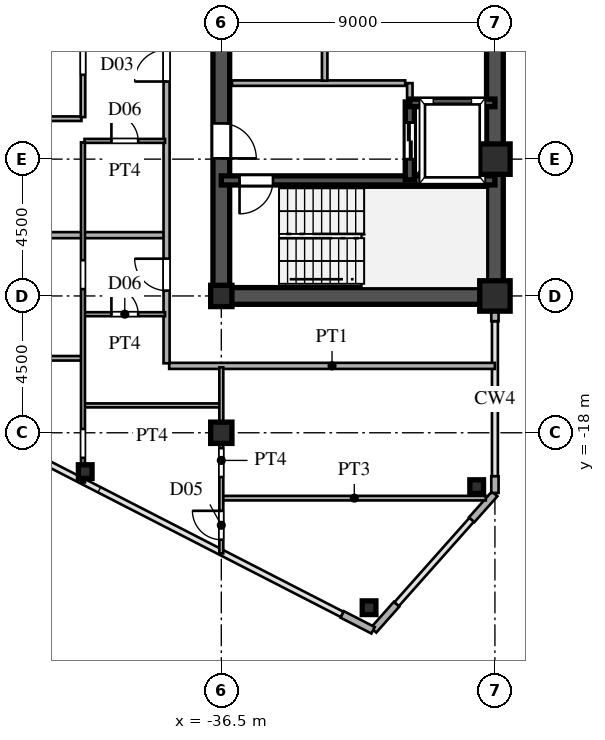
"""IFC4 building model, lengths in metres.
Left out: names, types, materials, properties, quantities, classifications, styles, units other than length and angle.
Written with IfcOpenShell. Run it as: python <this file> out.ifc"""

import sys

from ifc_helpers import new_model, si_unit, direction, frame, frame_2d, origin, origin_2d, place, context, subcontext, project, spatial, rectangle, hollow_rectangle, i_section, extrude, source, transform, mapped, element, fill, save


model = new_model("IFC4")
c1 = context("Model", 3, precision=1e-05, world=origin(), true_north=direction((0.0, 1.0)))
c2 = subcontext(c1, "Body", "Model", "MODEL_VIEW")
j1 = project(units=[si_unit("LENGTHUNIT", "METRE"), si_unit("PLANEANGLEUNIT", "RADIAN")], contexts=[c1])
p1 = place(None, origin())
s1 = spatial("IfcSite", under=j1, at=p1, CompositionType="ELEMENT")
p2 = place(p1, origin())
s2 = spatial("IfcBuilding", under=s1, at=p2, CompositionType="ELEMENT")
p3 = place(p2, frame((0.0, 0.0, 144.0)))
s3 = spatial("IfcBuildingStorey", under=s2, at=p3, CompositionType="ELEMENT", Elevation=144.0)
m1 = source(origin(), c2, "Body", "SweptSolid", [
    extrude(hollow_rectangle(XDim=1.0, YDim=1.0, WallThickness=0.042, at=origin_2d()), origin(), (0.0, 0.0, 1.0), 3.6),
])
for number, where, z_axis, x_axis in (
    (1, (-27.5, -13.5, 0.0), (0.0, 0.0, 1.0), (1.0, 0.0, 0.0)),
    (2, (-27.5, -9.0, 0.0), (0.0, 0.0, 1.0), (1.0, 0.0, 0.0)),
):
    element("IfcColumn", number, at=place(p3, frame(where, z_axis=z_axis, x_axis=x_axis)), inside=s3, PredefinedType="COLUMN", context=c2, shape_type="MappedRepresentation", body=[
        mapped(m1, transform((0.0, 0.0, 0.0), scale=1.0)),
    ])
m2 = source(origin(), c2, "Body", "SweptSolid", [
    extrude(i_section(OverallWidth=0.7, OverallDepth=0.7, WebThickness=0.028, FlangeThickness=0.045, at=origin_2d()), origin(), (0.0, 0.0, 1.0), 3.6),
])
for number, where, z_axis, x_axis in (
    (3, (-36.5, -18.0, 0.0), (0.0, 0.0, 1.0), (1.0, 0.0, 0.0)),
    (4, (-36.5, -13.5, 0.0), (0.0, 0.0, 1.0), (1.0, 0.0, 0.0)),
):
    element("IfcColumn", number, at=place(p3, frame(where, z_axis=z_axis, x_axis=x_axis)), inside=s3, PredefinedType="COLUMN", context=c2, shape_type="MappedRepresentation", body=[
        mapped(m2, transform((0.0, 0.0, 0.0), scale=1.0)),
    ])
m3 = source(origin(), c2, "Body", "SweptSolid", [
    extrude(hollow_rectangle(XDim=0.45, YDim=0.45, WallThickness=0.018, at=origin_2d()), origin(), (0.0, 0.0, 1.0), 3.6),
])
for number, where, z_axis, x_axis in (
    (5, (-28.1, -19.772, 0.0), (0.0, 0.0, 1.0), (1.0, 0.0, 0.0)),
    (6, (-31.64, -23.754, 0.0), (0.0, 0.0, 1.0), (1.0, 0.0, 0.0)),
    (7, (-40.976, -19.278, 0.0), (0.0, 0.0, 1.0), (1.0, 0.0, 0.0)),
):
    element("IfcColumn", number, at=place(p3, frame(where, z_axis=z_axis, x_axis=x_axis)), inside=s3, PredefinedType="COLUMN", context=c2, shape_type="MappedRepresentation", body=[
        mapped(m3, transform((0.0, 0.0, 0.0), scale=1.0)),
    ])
p4 = place(p3, frame((-27.5, -19.98, 0.0), z_axis=(0.0, 0.0, 1.0), x_axis=(0.0, 1.0, 0.0)))
e8 = element("IfcWall", 8, at=p4, inside=s3, PredefinedType="SOLIDWALL", context=c2, shape_type="SweptSolid", body=[
    extrude(rectangle(XDim=0.55, YDim=0.24, at=frame_2d((0.275, 0.0))), origin(), (0.0, 0.0, 1.0), 3.38),
])
p5 = place(p3, frame((-27.5, -14.33, 0.0), z_axis=(0.0, 0.0, 1.0), x_axis=(0.0, 1.0, 0.0)))
e9 = element("IfcWall", 9, at=p5, inside=s3, PredefinedType="SOLIDWALL", context=c2, shape_type="SweptSolid", body=[
    extrude(rectangle(XDim=0.55, YDim=0.24, at=frame_2d((0.275, 0.0))), origin(), (0.0, 0.0, 1.0), 2.88),
])
p6 = place(p3, frame((-32.523, -23.975, 0.0), z_axis=(0.0, 0.0, 1.0), x_axis=(0.889797395748, -0.456355776255, 0.0)))
e10 = element("IfcWall", 10, at=p6, inside=s3, PredefinedType="SOLIDWALL", context=c2, shape_type="SweptSolid", body=[
    extrude(rectangle(XDim=1.14, YDim=0.24, at=frame_2d((0.57, 0.0))), origin(), (0.0, 0.0, 1.0), 3.38),
])
for number, where, z_axis, x_axis in (
    (11, (-31.493, -24.492, 0.0), (0.0, 0.0, 1.0), (0.664, 0.747, 0.0)),
    (12, (-28.264, -20.86, 0.0), (0.0, 0.0, 1.0), (0.664, 0.747, 0.0)),
):
    element("IfcWall", number, at=place(p3, frame(where, z_axis=z_axis, x_axis=x_axis)), inside=s3, PredefinedType="SOLIDWALL", context=c2, shape_type="SweptSolid", body=[
        extrude(rectangle(XDim=1.14, YDim=0.24, at=frame_2d((0.57, 0.0))), origin(), (0.0, 0.0, 1.0), 3.38),
    ])
p7 = place(p3, frame((-27.5, -13.5, 0.0), z_axis=(0.0, 0.0, 1.0), x_axis=(0.0, 1.0, 0.0)))
e13 = element("IfcWall", 13, at=p7, inside=s3, PredefinedType="SHEAR", context=c2, shape_type="SweptSolid", body=[
    extrude(rectangle(XDim=12.2, YDim=0.55, at=frame_2d((6.1, 0.0))), origin(), (0.0, 0.0, 1.0), 3.38),
])
p8 = place(p3, frame((-36.5, -13.5, 0.0), z_axis=(0.0, 0.0, 1.0), x_axis=(1.0, 0.0, 0.0)))
e14 = element("IfcWall", 14, at=p8, inside=s3, PredefinedType="SHEAR", context=c2, shape_type="SweptSolid", body=[
    extrude(rectangle(XDim=9.0, YDim=0.55, at=frame_2d((4.5, 0.0))), origin(), (0.0, 0.0, 1.0), 3.38),
])
p9 = place(p3, frame((-36.5, -13.65, 0.0), z_axis=(0.0, 0.0, 1.0), x_axis=(0.0, 1.0, 0.0)))
e15 = element("IfcWall", 15, at=p9, inside=s3, PredefinedType="SHEAR", context=c2, shape_type="SweptSolid", body=[
    extrude(rectangle(XDim=7.15, YDim=0.55, at=frame_2d((3.575, 0.0))), origin(), (0.0, 0.0, 1.0), 3.38),
])
p10 = place(p9, frame((4.675, 0.0, 0.0)))
e16 = element("IfcOpeningElement", 16, at=p10, cuts=e15, PredefinedType="OPENING", context=c2, shape_type="SweptSolid", body=[
    extrude(rectangle(XDim=1.15, YDim=2.2, at=frame_2d((0.575, 1.1))), frame((0.0, 0.285, 0.0), z_axis=(0.0, -1.0, 0.0), x_axis=(1.0, 0.0, 0.0)), (0.0, 0.0, 1.0), 0.57),
])
p11 = place(p3, frame((-36.5, -6.5, 0.0), z_axis=(0.0, 0.0, 1.0), x_axis=(0.0, 1.0, 0.0)))
e17 = element("IfcWall", 17, at=p11, inside=s3, PredefinedType="SHEAR", context=c2, shape_type="SweptSolid", body=[
    extrude(rectangle(XDim=5.2, YDim=0.55, at=frame_2d((2.6, 0.0))), origin(), (0.0, 0.0, 1.0), 3.38),
])
p12 = place(p11, frame((2.125, 0.0, 0.0)))
e18 = element("IfcOpeningElement", 18, at=p12, cuts=e17, PredefinedType="OPENING", context=c2, shape_type="SweptSolid", body=[
    extrude(rectangle(XDim=0.95, YDim=2.15, at=frame_2d((0.475, 1.075))), frame((0.0, 0.285, 0.0), z_axis=(0.0, -1.0, 0.0), x_axis=(1.0, 0.0, 0.0)), (0.0, 0.0, 1.0), 0.57),
])
p13 = place(p3, frame((-36.5, -9.7, 0.0), z_axis=(0.0, 0.0, 1.0), x_axis=(1.0, 0.0, 0.0)))
e19 = element("IfcWall", 19, at=p13, inside=s3, PredefinedType="SHEAR", context=c2, shape_type="SweptSolid", body=[
    extrude(rectangle(XDim=9.0, YDim=0.3, at=frame_2d((4.5, 0.0))), origin(), (0.0, 0.0, 1.0), 3.38),
])
p14 = place(p13, frame((0.6, 0.0, 0.0)))
e20 = element("IfcOpeningElement", 20, at=p14, cuts=e19, PredefinedType="OPENING", context=c2, shape_type="SweptSolid", body=[
    extrude(rectangle(XDim=1.1, YDim=2.2, at=frame_2d((0.55, 1.1))), frame((0.0, 0.16, 0.0), z_axis=(0.0, -1.0, 0.0), x_axis=(1.0, 0.0, 0.0)), (0.0, 0.0, 1.0), 0.32),
])
p15 = place(p3, frame((-30.3, -7.15, 0.0), z_axis=(0.0, 0.0, 1.0), x_axis=(1.0, 0.0, 0.0)))
e21 = element("IfcWall", 21, at=p15, inside=s3, PredefinedType="SHEAR", context=c2, shape_type="SweptSolid", body=[
    extrude(rectangle(XDim=2.8, YDim=0.25, at=frame_2d((1.4, 0.0))), origin(), (0.0, 0.0, 1.0), 3.38),
])
p16 = place(p3, frame((-30.3, -9.68, 0.0), z_axis=(0.0, 0.0, 1.0), x_axis=(0.0, 1.0, 0.0)))
e22 = element("IfcWall", 22, at=p16, inside=s3, PredefinedType="SHEAR", context=c2, shape_type="SweptSolid", body=[
    extrude(rectangle(XDim=2.56, YDim=0.3, at=frame_2d((1.28, 0.0))), origin(), (0.0, 0.0, 1.0), 3.38),
])
p17 = place(p16, frame((0.68, 0.0, 0.0)))
e23 = element("IfcOpeningElement", 23, at=p17, cuts=e22, PredefinedType="OPENING", context=c2, shape_type="SweptSolid", body=[
    extrude(rectangle(XDim=1.2, YDim=2.25, at=frame_2d((0.6, 1.125))), frame((0.0, 0.16, 0.0), z_axis=(0.0, -1.0, 0.0), x_axis=(1.0, 0.0, 0.0)), (0.0, 0.0, 1.0), 0.32),
])
p18 = place(p3, frame((-36.15, -6.5, 0.0), z_axis=(0.0, 0.0, 1.0), x_axis=(1.0, 0.0, 0.0)))
e24 = element("IfcWall", 24, at=p18, inside=s3, PredefinedType="PARTITIONING", context=c2, shape_type="SweptSolid", body=[
    extrude(rectangle(XDim=5.7, YDim=0.18, at=frame_2d((2.85, 0.0))), origin(), (0.0, 0.0, 1.0), 3.38),
])
p19 = place(p3, frame((-30.3, -7.12, 0.0), z_axis=(0.0, 0.0, 1.0), x_axis=(0.0, 1.0, 0.0)))
e25 = element("IfcWall", 25, at=p19, inside=s3, PredefinedType="PARTITIONING", context=c2, shape_type="SweptSolid", body=[
    extrude(rectangle(XDim=0.62, YDim=0.18, at=frame_2d((0.31, 0.0))), origin(), (0.0, 0.0, 1.0), 3.38),
])
p20 = place(p3, frame((-33.1, -6.42, 0.0), z_axis=(0.0, 0.0, 1.0), x_axis=(0.0, 1.0, 0.0)))
e26 = element("IfcWall", 26, at=p20, inside=s3, PredefinedType="PARTITIONING", context=c2, shape_type="SweptSolid", body=[
    extrude(rectangle(XDim=5.04, YDim=0.18, at=frame_2d((2.52, 0.0))), origin(), (0.0, 0.0, 1.0), 3.38),
])
p21 = place(p3, frame((-36.45, -20.15, 0.0), z_axis=(0.0, 0.0, 1.0), x_axis=(1.0, 0.0, 0.0)))
e27 = element("IfcWall", 27, at=p21, inside=s3, PredefinedType="PARTITIONING", context=c2, shape_type="SweptSolid", body=[
    extrude(rectangle(XDim=8.649, YDim=0.15, at=frame_2d((4.325, 0.0))), origin(), (0.0, 0.0, 1.0), 3.38),
])
p22 = place(p3, frame((-41.0, -17.1, 0.0), z_axis=(0.0, 0.0, 1.0), x_axis=(1.0, 0.0, 0.0)))
e28 = element("IfcWall", 28, at=p22, inside=s3, PredefinedType="PARTITIONING", context=c2, shape_type="SweptSolid", body=[
    extrude(rectangle(XDim=4.45, YDim=0.13, at=frame_2d((2.225, 0.0))), origin(), (0.0, 0.0, 1.0), 3.38),
])
p23 = place(p3, frame((-38.215, -15.8, 0.0), z_axis=(0.0, 0.0, 1.0), x_axis=(1.0, 0.0, 0.0)))
e29 = element("IfcWall", 29, at=p23, inside=s3, PredefinedType="PARTITIONING", context=c2, shape_type="SweptSolid", body=[
    extrude(rectangle(XDim=10.715, YDim=0.2, at=frame_2d((5.357, 0.0))), origin(), (0.0, 0.0, 1.0), 3.38),
])
p24 = place(p3, frame((-48.977, -15.55, 0.0), z_axis=(0.0, 0.0, 1.0), x_axis=(1.0, 0.0, 0.0)))
e30 = element("IfcWall", 30, at=p24, inside=s3, PredefinedType="PARTITIONING", context=c2, shape_type="SweptSolid", body=[
    extrude(rectangle(XDim=7.877, YDim=0.15, at=frame_2d((3.938, 0.0))), origin(), (0.0, 0.0, 1.0), 3.38),
])
p25 = place(p24, frame((3.506, 0.0, 0.0)))
e31 = element("IfcOpeningElement", 31, at=p25, cuts=e30, PredefinedType="OPENING", context=c2, shape_type="SweptSolid", body=[
    extrude(rectangle(XDim=0.95, YDim=2.15, at=frame_2d((0.475, 1.075))), frame((0.0, 0.085, 0.0), z_axis=(0.0, -1.0, 0.0), x_axis=(1.0, 0.0, 0.0)), (0.0, 0.0, 1.0), 0.17),
])
p26 = place(p3, frame((-41.0, -14.1, 0.0), z_axis=(0.0, 0.0, 1.0), x_axis=(1.0, 0.0, 0.0)))
e32 = element("IfcWall", 32, at=p26, inside=s3, PredefinedType="PARTITIONING", context=c2, shape_type="SweptSolid", body=[
    extrude(rectangle(XDim=2.65, YDim=0.13, at=frame_2d((1.325, 0.0))), origin(), (0.0, 0.0, 1.0), 3.38),
])
p27 = place(p26, frame((0.885, 0.0, 0.0)))
e33 = element("IfcOpeningElement", 33, at=p27, cuts=e32, PredefinedType="OPENING", context=c2, shape_type="SweptSolid", body=[
    extrude(rectangle(XDim=0.88, YDim=2.1, at=frame_2d((0.44, 1.05))), frame((0.0, 0.075, 0.0), z_axis=(0.0, -1.0, 0.0), x_axis=(1.0, 0.0, 0.0)), (0.0, 0.0, 1.0), 0.15),
])
p28 = place(p3, frame((-56.844, -11.5, 0.0), z_axis=(0.0, 0.0, 1.0), x_axis=(1.0, 0.0, 0.0)))
e34 = element("IfcWall", 34, at=p28, inside=s3, PredefinedType="PARTITIONING", context=c2, shape_type="SweptSolid", body=[
    extrude(rectangle(XDim=18.464, YDim=0.2, at=frame_2d((9.232, 0.0))), origin(), (0.0, 0.0, 1.0), 3.38),
])
p29 = place(p3, frame((-41.0, -8.4, 0.0), z_axis=(0.0, 0.0, 1.0), x_axis=(1.0, 0.0, 0.0)))
e35 = element("IfcWall", 35, at=p29, inside=s3, PredefinedType="PARTITIONING", context=c2, shape_type="SweptSolid", body=[
    extrude(rectangle(XDim=2.65, YDim=0.13, at=frame_2d((1.325, 0.0))), origin(), (0.0, 0.0, 1.0), 3.38),
])
p30 = place(p29, frame((0.885, 0.0, 0.0)))
e36 = element("IfcOpeningElement", 36, at=p30, cuts=e35, PredefinedType="OPENING", context=c2, shape_type="SweptSolid", body=[
    extrude(rectangle(XDim=0.88, YDim=2.1, at=frame_2d((0.44, 1.05))), frame((0.0, 0.075, 0.0), z_axis=(0.0, -1.0, 0.0), x_axis=(1.0, 0.0, 0.0)), (0.0, 0.0, 1.0), 0.15),
])
p31 = place(p3, frame((-64.338, -7.67, 0.0), z_axis=(0.0, 0.0, 1.0), x_axis=(1.0, 0.0, 0.0)))
e37 = element("IfcWall", 37, at=p31, inside=s3, PredefinedType="PARTITIONING", context=c2, shape_type="SweptSolid", body=[
    extrude(rectangle(XDim=23.238, YDim=0.15, at=frame_2d((11.619, 0.0))), origin(), (0.0, 0.0, 1.0), 3.38),
])
p32 = place(p31, frame((16.088, 0.0, 0.0)))
e38 = element("IfcOpeningElement", 38, at=p32, cuts=e37, PredefinedType="OPENING", context=c2, shape_type="SweptSolid", body=[
    extrude(rectangle(XDim=0.95, YDim=2.15, at=frame_2d((0.475, 1.075))), frame((0.0, 0.085, 0.0), z_axis=(0.0, -1.0, 0.0), x_axis=(1.0, 0.0, 0.0)), (0.0, 0.0, 1.0), 0.17),
])
p33 = place(p3, frame((-41.05, -19.634, 0.0), z_axis=(0.0, 0.0, 1.0), x_axis=(0.0, 1.0, 0.0)))
e39 = element("IfcWall", 39, at=p33, inside=s3, PredefinedType="PARTITIONING", context=c2, shape_type="SweptSolid", body=[
    extrude(rectangle(XDim=11.187, YDim=0.13, at=frame_2d((5.594, 0.0))), origin(), (0.0, 0.0, 1.0), 2.99),
])
p34 = place(p33, frame((6.359, 0.0, 0.0)))
e40 = element("IfcOpeningElement", 40, at=p34, cuts=e39, PredefinedType="OPENING", context=c2, shape_type="SweptSolid", body=[
    extrude(rectangle(XDim=0.95, YDim=2.15, at=frame_2d((0.475, 1.075))), frame((0.0, 0.075, 0.0), z_axis=(0.0, -1.0, 0.0), x_axis=(1.0, 0.0, 0.0)), (0.0, 0.0, 1.0), 0.15),
])
p35 = place(p33, frame((0.809, 0.0, 0.0)))
e41 = element("IfcOpeningElement", 41, at=p35, cuts=e39, PredefinedType="OPENING", context=c2, shape_type="SweptSolid", body=[
    extrude(rectangle(XDim=0.95, YDim=2.15, at=frame_2d((0.475, 1.075))), frame((0.0, 0.075, 0.0), z_axis=(0.0, -1.0, 0.0), x_axis=(1.0, 0.0, 0.0)), (0.0, 0.0, 1.0), 0.15),
])
p36 = place(p3, frame((-41.05, -7.617, 0.0), z_axis=(0.0, 0.0, 1.0), x_axis=(0.0, 1.0, 0.0)))
e42 = element("IfcWall", 42, at=p36, inside=s3, PredefinedType="PARTITIONING", context=c2, shape_type="SweptSolid", body=[
    extrude(rectangle(XDim=3.734, YDim=0.15, at=frame_2d((1.867, 0.0))), origin(), (0.0, 0.0, 1.0), 2.99),
])
p37 = place(p36, frame((1.392, 0.0, 0.0)))
e43 = element("IfcOpeningElement", 43, at=p37, cuts=e42, PredefinedType="OPENING", context=c2, shape_type="SweptSolid", body=[
    extrude(rectangle(XDim=0.95, YDim=2.15, at=frame_2d((0.475, 1.075))), frame((0.0, 0.085, 0.0), z_axis=(0.0, -1.0, 0.0), x_axis=(1.0, 0.0, 0.0)), (0.0, 0.0, 1.0), 0.17),
])
p38 = place(p3, frame((-38.3, -15.715, 0.0), z_axis=(0.0, 0.0, 1.0), x_axis=(0.0, 1.0, 0.0)))
e44 = element("IfcWall", 44, at=p38, inside=s3, PredefinedType="PARTITIONING", context=c2, shape_type="SweptSolid", body=[
    extrude(rectangle(XDim=31.43, YDim=0.2, at=frame_2d((15.715, 0.0))), origin(), (0.0, 0.0, 1.0), 3.38),
])
p39 = place(p38, frame((2.39, 0.0, 0.0)))
e45 = element("IfcOpeningElement", 45, at=p39, cuts=e44, PredefinedType="OPENING", context=c2, shape_type="SweptSolid", body=[
    extrude(rectangle(XDim=1.05, YDim=2.25, at=frame_2d((0.525, 1.125))), frame((0.0, 0.11, 0.0), z_axis=(0.0, -1.0, 0.0), x_axis=(1.0, 0.0, 0.0)), (0.0, 0.0, 1.0), 0.22),
])
p40 = place(p38, frame((9.268, 0.0, 0.0)))
e46 = element("IfcOpeningElement", 46, at=p40, cuts=e44, PredefinedType="OPENING", context=c2, shape_type="SweptSolid", body=[
    extrude(rectangle(XDim=1.05, YDim=2.25, at=frame_2d((0.525, 1.125))), frame((0.0, 0.11, 0.0), z_axis=(0.0, -1.0, 0.0), x_axis=(1.0, 0.0, 0.0)), (0.0, 0.0, 1.0), 0.22),
])
p41 = place(p38, frame((20.04, 0.0, 0.0)))
e47 = element("IfcOpeningElement", 47, at=p41, cuts=e44, PredefinedType="OPENING", context=c2, shape_type="SweptSolid", body=[
    extrude(rectangle(XDim=1.05, YDim=2.25, at=frame_2d((0.525, 1.125))), frame((0.0, 0.11, 0.0), z_axis=(0.0, -1.0, 0.0), x_axis=(1.0, 0.0, 0.0)), (0.0, 0.0, 1.0), 0.22),
])
p42 = place(p38, frame((26.587, 0.0, 0.0)))
e48 = element("IfcOpeningElement", 48, at=p42, cuts=e44, PredefinedType="OPENING", context=c2, shape_type="SweptSolid", body=[
    extrude(rectangle(XDim=1.05, YDim=2.25, at=frame_2d((0.525, 1.125))), frame((0.0, 0.11, 0.0), z_axis=(0.0, -1.0, 0.0), x_axis=(1.0, 0.0, 0.0)), (0.0, 0.0, 1.0), 0.22),
])
p43 = place(p3, frame((-36.5, -21.969, 0.0), z_axis=(0.0, 0.0, 1.0), x_axis=(0.0, 1.0, 0.0)))
e49 = element("IfcWall", 49, at=p43, inside=s3, PredefinedType="PARTITIONING", context=c2, shape_type="SweptSolid", body=[
    extrude(rectangle(XDim=6.119, YDim=0.13, at=frame_2d((3.06, 0.0))), origin(), (0.0, 0.0, 1.0), 2.78),
])
p44 = place(p43, frame((0.452, 0.0, 0.0)))
e50 = element("IfcOpeningElement", 50, at=p44, cuts=e49, PredefinedType="OPENING", context=c2, shape_type="SweptSolid", body=[
    extrude(rectangle(XDim=0.95, YDim=2.15, at=frame_2d((0.475, 1.075))), frame((0.0, 0.075, 0.0), z_axis=(0.0, -1.0, 0.0), x_axis=(1.0, 0.0, 0.0)), (0.0, 0.0, 1.0), 0.15),
])
p45 = place(p43, frame((2.513, 0.0, 0.0)))
e51 = element("IfcOpeningElement", 51, at=p45, cuts=e49, PredefinedType="OPENING", context=c2, shape_type="SweptSolid", body=[
    extrude(rectangle(XDim=0.95, YDim=2.15, at=frame_2d((0.475, 1.075))), frame((0.0, 0.075, 0.0), z_axis=(0.0, -1.0, 0.0), x_axis=(1.0, 0.0, 0.0)), (0.0, 0.0, 1.0), 0.15),
])
m4 = source(origin(), c2, "Body", "SweptSolid", [
    extrude(rectangle(XDim=1.15, YDim=2.2, at=frame_2d((0.575, 1.1))), frame((0.0, 0.025, 0.0), z_axis=(0.0, -1.0, 0.0), x_axis=(1.0, 0.0, 0.0)), (0.0, 0.0, 1.0), 0.05),
])
p46 = place(p10, frame((1.15, 0.0, 0.0), z_axis=(0.0, 0.0, 1.0), x_axis=(-1.0, 0.0, 0.0)))
e52 = element("IfcDoor", 52, at=p46, inside=s3, OperationType="SINGLE_SWING_LEFT", PredefinedType="DOOR", context=c2, shape_type="MappedRepresentation", body=[
    mapped(m4, transform((0.0, 0.0, 0.0), scale=1.0)),
])
fill(e16, e52)
m5 = source(origin(), c2, "Body", "SweptSolid", [
    extrude(rectangle(XDim=1.1, YDim=2.2, at=frame_2d((0.55, 1.1))), frame((0.0, 0.025, 0.0), z_axis=(0.0, -1.0, 0.0), x_axis=(1.0, 0.0, 0.0)), (0.0, 0.0, 1.0), 0.05),
])
p47 = place(p14, frame((1.1, 0.0, 0.0), z_axis=(0.0, 0.0, 1.0), x_axis=(-1.0, 0.0, 0.0)))
e53 = element("IfcDoor", 53, at=p47, inside=s3, OperationType="SINGLE_SWING_LEFT", PredefinedType="DOOR", context=c2, shape_type="MappedRepresentation", body=[
    mapped(m5, transform((0.0, 0.0, 0.0), scale=1.0)),
])
fill(e20, e53)
m6 = source(origin(), c2, "Body", "SweptSolid", [
    extrude(rectangle(XDim=1.2, YDim=2.25, at=frame_2d((0.6, 1.125))), frame((0.0, 0.025, 0.0), z_axis=(0.0, -1.0, 0.0), x_axis=(1.0, 0.0, 0.0)), (0.0, 0.0, 1.0), 0.05),
])
p48 = place(p17, origin())
e54 = element("IfcDoor", 54, at=p48, inside=s3, OperationType="DOUBLE_DOOR_SLIDING", PredefinedType="DOOR", context=c2, shape_type="MappedRepresentation", body=[
    mapped(m6, transform((0.0, 0.0, 0.0), scale=1.0)),
])
fill(e23, e54)
m7 = source(origin(), c2, "Body", "SweptSolid", [
    extrude(rectangle(XDim=0.88, YDim=2.1, at=frame_2d((0.44, 1.05))), frame((0.0, 0.025, 0.0), z_axis=(0.0, -1.0, 0.0), x_axis=(1.0, 0.0, 0.0)), (0.0, 0.0, 1.0), 0.05),
])
p49 = place(p27, origin())
e55 = element("IfcDoor", 55, at=p49, inside=s3, OperationType="SINGLE_SWING_LEFT", PredefinedType="DOOR", context=c2, shape_type="MappedRepresentation", body=[
    mapped(m7, transform((0.0, 0.0, 0.0), scale=1.0)),
])
fill(e33, e55)
p50 = place(p30, origin())
e56 = element("IfcDoor", 56, at=p50, inside=s3, OperationType="SINGLE_SWING_LEFT", PredefinedType="DOOR", context=c2, shape_type="MappedRepresentation", body=[
    mapped(m7, transform((0.0, 0.0, 0.0), scale=1.0)),
])
fill(e36, e56)
m8 = source(origin(), c2, "Body", "SweptSolid", [
    extrude(rectangle(XDim=1.05, YDim=2.25, at=frame_2d((0.525, 1.125))), frame((0.0, 0.025, 0.0), z_axis=(0.0, -1.0, 0.0), x_axis=(1.0, 0.0, 0.0)), (0.0, 0.0, 1.0), 0.05),
])
p51 = place(p39, origin())
e57 = element("IfcDoor", 57, at=p51, inside=s3, OperationType="SINGLE_SWING_RIGHT", PredefinedType="DOOR", context=c2, shape_type="MappedRepresentation", body=[
    mapped(m8, transform((0.0, 0.0, 0.0), scale=1.0)),
])
fill(e45, e57)
p52 = place(p40, origin())
e58 = element("IfcDoor", 58, at=p52, inside=s3, OperationType="SINGLE_SWING_LEFT", PredefinedType="DOOR", context=c2, shape_type="MappedRepresentation", body=[
    mapped(m8, transform((0.0, 0.0, 0.0), scale=1.0)),
])
fill(e46, e58)
m9 = source(origin(), c2, "Body", "SweptSolid", [
    extrude(rectangle(XDim=0.95, YDim=2.15, at=frame_2d((0.475, 1.075))), frame((0.0, 0.025, 0.0), z_axis=(0.0, -1.0, 0.0), x_axis=(1.0, 0.0, 0.0)), (0.0, 0.0, 1.0), 0.05),
])
p53 = place(p44, origin())
e59 = element("IfcDoor", 59, at=p53, inside=s3, OperationType="SINGLE_SWING_RIGHT", PredefinedType="DOOR", context=c2, shape_type="MappedRepresentation", body=[
    mapped(m9, transform((0.0, 0.0, 0.0), scale=1.0)),
])
fill(e50, e59)
save(model, sys.argv[1])
